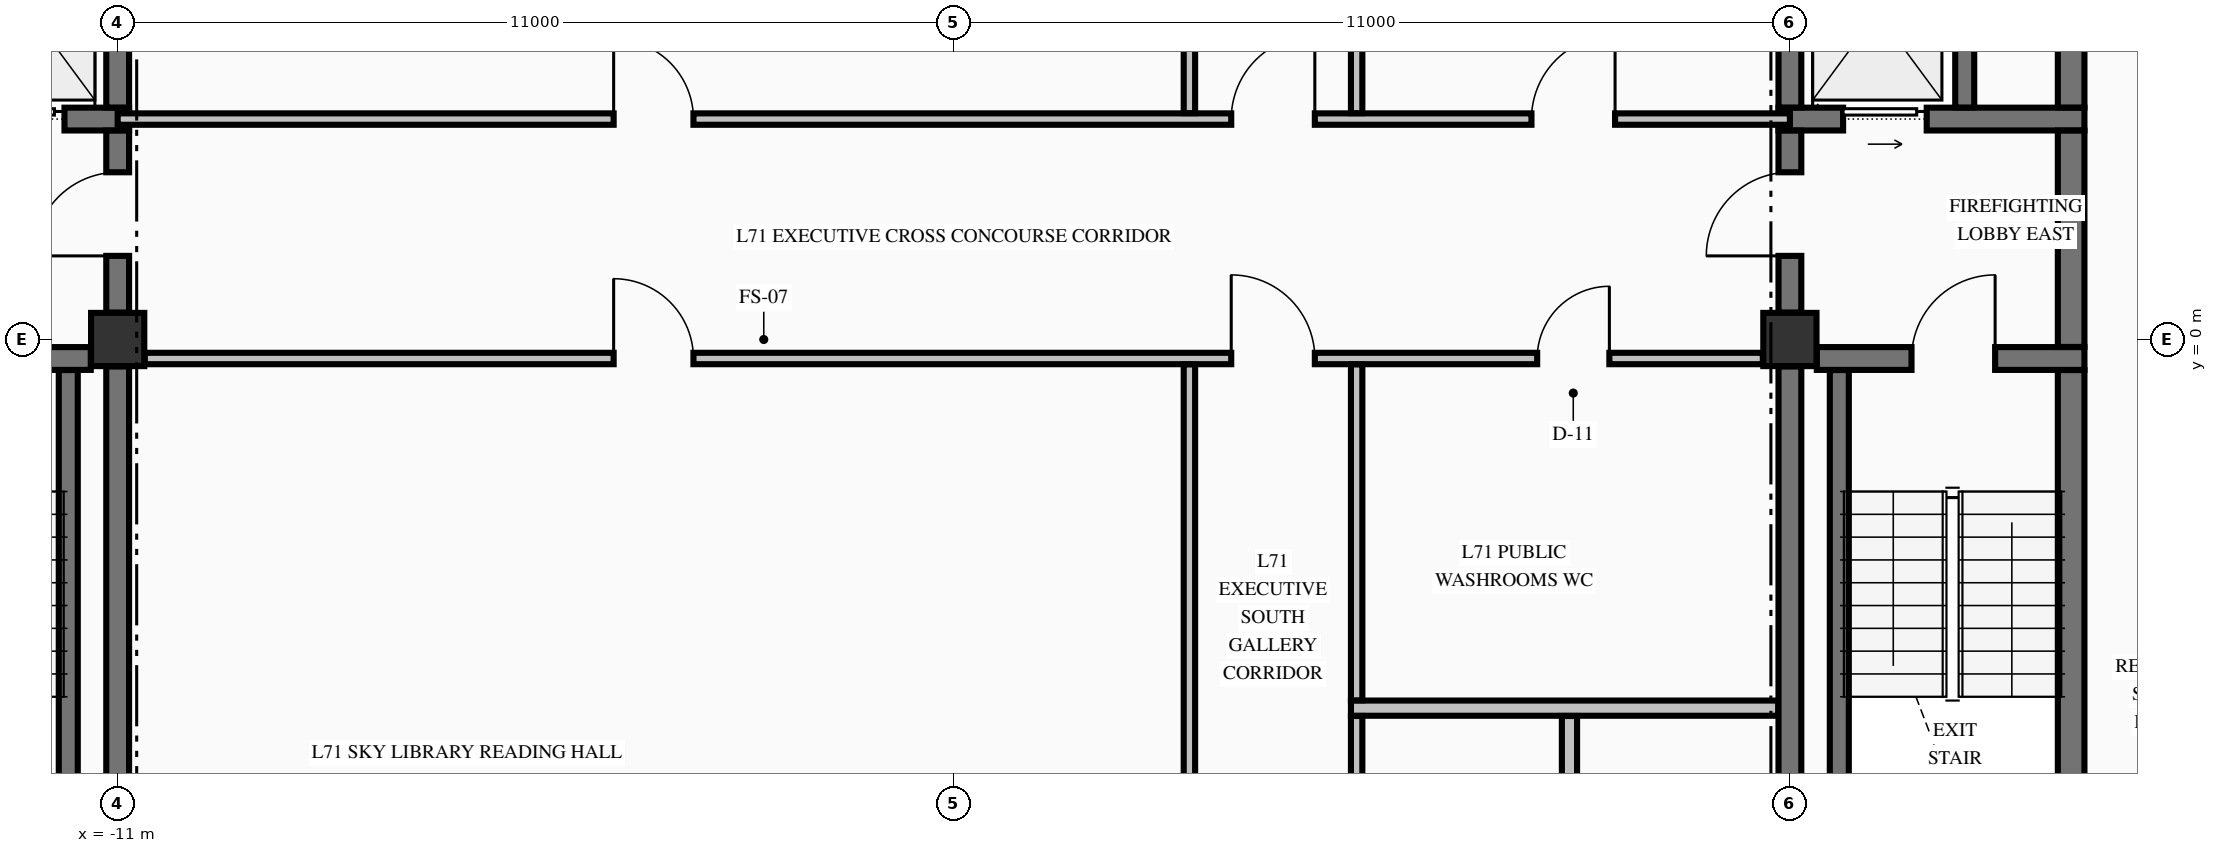
"""IFC4 building model, lengths in metres.
Left out: names, types, materials, properties, quantities, classifications, styles, units other than length and angle.
Written with IfcOpenShell. Run it as: python <this file> out.ifc"""

import sys

from ifc_helpers import new_model, si_unit, direction, frame, frame_2d, origin, origin_2d, place, context, subcontext, project, spatial, rectangle, extrude, element, fill, save


model = new_model("IFC4")
c1 = context("Model", 3, precision=1e-05, world=origin(), true_north=direction((0.0, 1.0)))
c2 = subcontext(c1, "Body", "Model", "MODEL_VIEW")
j1 = project(units=[si_unit("LENGTHUNIT", "METRE"), si_unit("PLANEANGLEUNIT", "RADIAN")], contexts=[c1])
p1 = place(None, origin())
s1 = spatial("IfcSite", under=j1, at=p1, CompositionType="ELEMENT")
p2 = place(p1, origin())
s2 = spatial("IfcBuilding", under=s1, at=p2, CompositionType="ELEMENT")
p3 = place(p2, frame((0.0, 0.0, 267.35)))
s3 = spatial("IfcBuildingStorey", under=s2, at=p3, CompositionType="ELEMENT", Elevation=267.35)
for number, where, z_axis, x_axis in (
    (1, (-11.0, 0.0, -0.25), (0.0, 0.0, 1.0), (1.0, 0.0, 0.0)),
    (2, (11.0, 0.0, -0.25), (0.0, 0.0, 1.0), (1.0, 0.0, 0.0)),
):
    element("IfcColumn", number, at=place(p3, frame(where, z_axis=z_axis, x_axis=x_axis)), inside=s3, PredefinedType="COLUMN", context=c2, shape_type="SweptSolid", body=[
        extrude(rectangle(XDim=0.7, YDim=0.7, at=origin_2d()), origin(), (0.0, 0.0, 1.0), 3.155),
    ])
p4 = place(p3, frame((-19.646, -0.25, 0.0), z_axis=(0.0, 0.0, 1.0), x_axis=(1.0, 0.0, 0.0)))
e3 = element("IfcWall", 3, at=p4, inside=s3, PredefinedType="SHEAR", context=c2, shape_type="SweptSolid", body=[
    extrude(rectangle(XDim=8.292, YDim=0.3, at=frame_2d((4.146, 0.0))), origin(), (0.0, 0.0, 1.0), 2.905),
])
p5 = place(p4, frame((5.946, 0.0, 0.0)))
e4 = element("IfcOpeningElement", 4, at=p5, cuts=e3, PredefinedType="OPENING", context=c2, shape_type="SweptSolid", body=[
    extrude(rectangle(XDim=1.1, YDim=2.15, at=frame_2d((0.55, 1.075))), frame((0.0, 0.16, 0.0), z_axis=(0.0, -1.0, 0.0), x_axis=(1.0, 0.0, 0.0)), (0.0, 0.0, 1.0), 0.32),
])
p6 = place(p3, frame((11.354, -0.25, 0.0), z_axis=(0.0, 0.0, 1.0), x_axis=(1.0, 0.0, 0.0)))
e5 = element("IfcWall", 5, at=p6, inside=s3, PredefinedType="SHEAR", context=c2, shape_type="SweptSolid", body=[
    extrude(rectangle(XDim=3.521, YDim=0.3, at=frame_2d((1.76, 0.0))), origin(), (0.0, 0.0, 1.0), 2.905),
])
p7 = place(p6, frame((1.246, 0.0, 0.0)))
e6 = element("IfcOpeningElement", 6, at=p7, cuts=e5, PredefinedType="OPENING", context=c2, shape_type="SweptSolid", body=[
    extrude(rectangle(XDim=1.1, YDim=2.15, at=frame_2d((0.55, 1.075))), frame((0.0, 0.16, 0.0), z_axis=(0.0, -1.0, 0.0), x_axis=(1.0, 0.0, 0.0)), (0.0, 0.0, 1.0), 0.32),
])
p8 = place(p3, frame((-14.875, 2.9, 0.0), z_axis=(0.0, 0.0, 1.0), x_axis=(1.0, 0.0, 0.0)))
e7 = element("IfcWall", 7, at=p8, inside=s3, PredefinedType="SHEAR", context=c2, shape_type="SweptSolid", body=[
    extrude(rectangle(XDim=4.025, YDim=0.3, at=frame_2d((2.012, 0.0))), origin(), (0.0, 0.0, 1.0), 2.905),
])
p9 = place(p8, frame((2.075, 0.0, 0.0)))
e8 = element("IfcOpeningElement", 8, at=p9, cuts=e7, PredefinedType="OPENING", context=c2, shape_type="SweptSolid", body=[
    extrude(rectangle(XDim=1.1, YDim=2.2, at=frame_2d((0.55, 1.1))), frame((0.0, 0.16, 0.0), z_axis=(0.0, -1.0, 0.0), x_axis=(1.0, 0.0, 0.0)), (0.0, 0.0, 1.0), 0.32),
])
p10 = place(p3, frame((10.85, 2.9, 0.0), z_axis=(0.0, 0.0, 1.0), x_axis=(1.0, 0.0, 0.0)))
e9 = element("IfcWall", 9, at=p10, inside=s3, PredefinedType="SHEAR", context=c2, shape_type="SweptSolid", body=[
    extrude(rectangle(XDim=4.025, YDim=0.3, at=frame_2d((2.012, 0.0))), origin(), (0.0, 0.0, 1.0), 2.905),
])
p11 = place(p10, frame((0.85, 0.0, 0.0)))
e10 = element("IfcOpeningElement", 10, at=p11, cuts=e9, PredefinedType="OPENING", context=c2, shape_type="SweptSolid", body=[
    extrude(rectangle(XDim=1.1, YDim=2.2, at=frame_2d((0.55, 1.1))), frame((0.0, 0.16, 0.0), z_axis=(0.0, -1.0, 0.0), x_axis=(1.0, 0.0, 0.0)), (0.0, 0.0, 1.0), 0.32),
])
p12 = place(p3, frame((5.225, -4.85, 0.0), z_axis=(0.0, 0.0, 1.0), x_axis=(1.0, 0.0, 0.0)))
e11 = element("IfcWall", 11, at=p12, inside=s3, PredefinedType="PARTITIONING", context=c2, shape_type="SweptSolid", body=[
    extrude(rectangle(XDim=5.622, YDim=0.2, at=frame_2d((2.811, 0.0))), origin(), (0.0, 0.0, 1.0), 2.905),
])
p13 = place(p3, frame((-10.644, -0.25, 0.0), z_axis=(0.0, 0.0, 1.0), x_axis=(1.0, 0.0, 0.0)))
e12 = element("IfcWall", 12, at=p13, inside=s3, PredefinedType="PARTITIONING", context=c2, shape_type="SweptSolid", body=[
    extrude(rectangle(XDim=21.288, YDim=0.15, at=frame_2d((10.644, 0.0))), origin(), (0.0, 0.0, 1.0), 2.905),
])
p14 = place(p13, frame((14.294, 0.0, 0.0)))
e13 = element("IfcOpeningElement", 13, at=p14, cuts=e12, PredefinedType="OPENING", context=c2, shape_type="SweptSolid", body=[
    extrude(rectangle(XDim=1.1, YDim=2.15, at=frame_2d((0.55, 1.075))), frame((0.0, 0.085, 0.0), z_axis=(0.0, -1.0, 0.0), x_axis=(1.0, 0.0, 0.0)), (0.0, 0.0, 1.0), 0.17),
])
p15 = place(p13, frame((6.169, 0.0, 0.0)))
e14 = element("IfcOpeningElement", 14, at=p15, cuts=e12, PredefinedType="OPENING", context=c2, shape_type="SweptSolid", body=[
    extrude(rectangle(XDim=1.05, YDim=2.15, at=frame_2d((0.525, 1.075))), frame((0.0, 0.085, 0.0), z_axis=(0.0, -1.0, 0.0), x_axis=(1.0, 0.0, 0.0)), (0.0, 0.0, 1.0), 0.17),
])
p16 = place(p13, frame((18.319, 0.0, 0.0)))
e15 = element("IfcOpeningElement", 15, at=p16, cuts=e12, PredefinedType="OPENING", context=c2, shape_type="SweptSolid", body=[
    extrude(rectangle(XDim=0.95, YDim=2.15, at=frame_2d((0.475, 1.075))), frame((0.0, 0.085, 0.0), z_axis=(0.0, -1.0, 0.0), x_axis=(1.0, 0.0, 0.0)), (0.0, 0.0, 1.0), 0.17),
])
p17 = place(p3, frame((-11.0, 2.9, 0.0), z_axis=(0.0, 0.0, 1.0), x_axis=(1.0, 0.0, 0.0)))
e16 = element("IfcWall", 16, at=p17, inside=s3, PredefinedType="PARTITIONING", context=c2, shape_type="SweptSolid", body=[
    extrude(rectangle(XDim=22.0, YDim=0.15, at=frame_2d((11.0, 0.0))), origin(), (0.0, 0.0, 1.0), 2.905),
])
p18 = place(p17, frame((14.65, 0.0, 0.0)))
e17 = element("IfcOpeningElement", 17, at=p18, cuts=e16, PredefinedType="OPENING", context=c2, shape_type="SweptSolid", body=[
    extrude(rectangle(XDim=1.1, YDim=2.15, at=frame_2d((0.55, 1.075))), frame((0.0, 0.085, 0.0), z_axis=(0.0, -1.0, 0.0), x_axis=(1.0, 0.0, 0.0)), (0.0, 0.0, 1.0), 0.17),
])
p19 = place(p17, frame((6.525, 0.0, 0.0)))
e18 = element("IfcOpeningElement", 18, at=p19, cuts=e16, PredefinedType="OPENING", context=c2, shape_type="SweptSolid", body=[
    extrude(rectangle(XDim=1.05, YDim=2.15, at=frame_2d((0.525, 1.075))), frame((0.0, 0.085, 0.0), z_axis=(0.0, -1.0, 0.0), x_axis=(1.0, 0.0, 0.0)), (0.0, 0.0, 1.0), 0.17),
])
p20 = place(p17, frame((18.6, 0.0, 0.0)))
e19 = element("IfcOpeningElement", 19, at=p20, cuts=e16, PredefinedType="OPENING", context=c2, shape_type="SweptSolid", body=[
    extrude(rectangle(XDim=1.1, YDim=2.15, at=frame_2d((0.55, 1.075))), frame((0.0, 0.085, 0.0), z_axis=(0.0, -1.0, 0.0), x_axis=(1.0, 0.0, 0.0)), (0.0, 0.0, 1.0), 0.17),
])
p21 = place(p3, frame((-11.65, -9.798, 0.0), z_axis=(0.0, 0.0, 1.0), x_axis=(0.0, 1.0, 0.0)))
e20 = element("IfcWall", 20, at=p21, inside=s3, PredefinedType="SOLIDWALL", context=c2, shape_type="SweptSolid", body=[
    extrude(rectangle(XDim=9.396, YDim=0.25, at=frame_2d((4.698, 0.0))), origin(), (0.0, 0.0, 1.0), 2.905),
])
p22 = place(p3, frame((-11.0, -9.596, 0.0), z_axis=(0.0, 0.0, 1.0), x_axis=(0.0, 1.0, 0.0)))
e21 = element("IfcWall", 21, at=p22, inside=s3, PredefinedType="SHEAR", context=c2, shape_type="SweptSolid", body=[
    extrude(rectangle(XDim=9.242, YDim=0.3, at=frame_2d((4.621, 0.0))), origin(), (0.0, 0.0, 1.0), 2.905),
])
p23 = place(p3, frame((-11.0, 0.354, 0.0), z_axis=(0.0, 0.0, 1.0), x_axis=(0.0, 1.0, 0.0)))
e22 = element("IfcWall", 22, at=p23, inside=s3, PredefinedType="SHEAR", context=c2, shape_type="SweptSolid", body=[
    extrude(rectangle(XDim=2.394, YDim=0.3, at=frame_2d((1.197, 0.0))), origin(), (0.0, 0.0, 1.0), 2.905),
])
p24 = place(p23, frame((0.746, 0.0, 0.0)))
e23 = element("IfcOpeningElement", 23, at=p24, cuts=e22, PredefinedType="OPENING", context=c2, shape_type="SweptSolid", body=[
    extrude(rectangle(XDim=1.1, YDim=2.15, at=frame_2d((0.55, 1.075))), frame((0.0, 0.16, 0.0), z_axis=(0.0, -1.0, 0.0), x_axis=(1.0, 0.0, 0.0)), (0.0, 0.0, 1.0), 0.32),
])
p25 = place(p3, frame((-11.0, 3.052, 0.0), z_axis=(0.0, 0.0, 1.0), x_axis=(0.0, 1.0, 0.0)))
e24 = element("IfcWall", 24, at=p25, inside=s3, PredefinedType="SHEAR", context=c2, shape_type="SweptSolid", body=[
    extrude(rectangle(XDim=2.496, YDim=0.3, at=frame_2d((1.248, 0.0))), origin(), (0.0, 0.0, 1.0), 2.905),
])
p26 = place(p3, frame((11.0, -9.596, 0.0), z_axis=(0.0, 0.0, 1.0), x_axis=(0.0, 1.0, 0.0)))
e25 = element("IfcWall", 25, at=p26, inside=s3, PredefinedType="SHEAR", context=c2, shape_type="SweptSolid", body=[
    extrude(rectangle(XDim=9.242, YDim=0.3, at=frame_2d((4.621, 0.0))), origin(), (0.0, 0.0, 1.0), 2.905),
])
p27 = place(p3, frame((11.0, 0.354, 0.0), z_axis=(0.0, 0.0, 1.0), x_axis=(0.0, 1.0, 0.0)))
e26 = element("IfcWall", 26, at=p27, inside=s3, PredefinedType="SHEAR", context=c2, shape_type="SweptSolid", body=[
    extrude(rectangle(XDim=2.394, YDim=0.3, at=frame_2d((1.197, 0.0))), origin(), (0.0, 0.0, 1.0), 2.905),
])
p28 = place(p27, frame((0.746, 0.0, 0.0)))
e27 = element("IfcOpeningElement", 27, at=p28, cuts=e26, PredefinedType="OPENING", context=c2, shape_type="SweptSolid", body=[
    extrude(rectangle(XDim=1.1, YDim=2.15, at=frame_2d((0.55, 1.075))), frame((0.0, 0.16, 0.0), z_axis=(0.0, -1.0, 0.0), x_axis=(1.0, 0.0, 0.0)), (0.0, 0.0, 1.0), 0.32),
])
p29 = place(p3, frame((11.0, 3.052, 0.0), z_axis=(0.0, 0.0, 1.0), x_axis=(0.0, 1.0, 0.0)))
e28 = element("IfcWall", 28, at=p29, inside=s3, PredefinedType="SHEAR", context=c2, shape_type="SweptSolid", body=[
    extrude(rectangle(XDim=2.496, YDim=0.3, at=frame_2d((1.248, 0.0))), origin(), (0.0, 0.0, 1.0), 2.905),
])
p30 = place(p3, frame((11.65, -9.798, 0.0), z_axis=(0.0, 0.0, 1.0), x_axis=(0.0, 1.0, 0.0)))
e29 = element("IfcWall", 29, at=p30, inside=s3, PredefinedType="SOLIDWALL", context=c2, shape_type="SweptSolid", body=[
    extrude(rectangle(XDim=9.396, YDim=0.25, at=frame_2d((4.698, 0.0))), origin(), (0.0, 0.0, 1.0), 2.905),
])
p31 = place(p3, frame((13.3, 3.052, 0.0), z_axis=(0.0, 0.0, 1.0), x_axis=(0.0, 1.0, 0.0)))
e30 = element("IfcWall", 30, at=p31, inside=s3, PredefinedType="SOLIDWALL", context=c2, shape_type="SweptSolid", body=[
    extrude(rectangle(XDim=2.496, YDim=0.25, at=frame_2d((1.248, 0.0))), origin(), (0.0, 0.0, 1.0), 2.905),
])
p32 = place(p3, frame((14.7, -9.773, 0.0), z_axis=(0.0, 0.0, 1.0), x_axis=(0.0, 1.0, 0.0)))
e31 = element("IfcWall", 31, at=p32, inside=s3, PredefinedType="SHEAR", context=c2, shape_type="SweptSolid", body=[
    extrude(rectangle(XDim=9.371, YDim=0.35, at=frame_2d((4.686, 0.0))), origin(), (0.0, 0.0, 1.0), 2.905),
])
p33 = place(p3, frame((14.7, -0.098, 0.0), z_axis=(0.0, 0.0, 1.0), x_axis=(0.0, 1.0, 0.0)))
e32 = element("IfcWall", 32, at=p33, inside=s3, PredefinedType="SHEAR", context=c2, shape_type="SweptSolid", body=[
    extrude(rectangle(XDim=2.846, YDim=0.35, at=frame_2d((1.423, 0.0))), origin(), (0.0, 0.0, 1.0), 2.905),
])
p34 = place(p3, frame((14.7, 3.052, 0.0), z_axis=(0.0, 0.0, 1.0), x_axis=(0.0, 1.0, 0.0)))
e33 = element("IfcWall", 33, at=p34, inside=s3, PredefinedType="SHEAR", context=c2, shape_type="SweptSolid", body=[
    extrude(rectangle(XDim=2.496, YDim=0.35, at=frame_2d((1.248, 0.0))), origin(), (0.0, 0.0, 1.0), 2.905),
])
p35 = place(p3, frame((3.1, -9.872, 0.0), z_axis=(0.0, 0.0, 1.0), x_axis=(0.0, 1.0, 0.0)))
e34 = element("IfcWall", 34, at=p35, inside=s3, PredefinedType="PARTITIONING", context=c2, shape_type="SweptSolid", body=[
    extrude(rectangle(XDim=9.544, YDim=0.15, at=frame_2d((4.772, 0.0))), origin(), (0.0, 0.0, 1.0), 2.905),
])
p36 = place(p3, frame((3.1, 2.978, 0.0), z_axis=(0.0, 0.0, 1.0), x_axis=(0.0, 1.0, 0.0)))
e35 = element("IfcWall", 35, at=p36, inside=s3, PredefinedType="PARTITIONING", context=c2, shape_type="SweptSolid", body=[
    extrude(rectangle(XDim=7.444, YDim=0.15, at=frame_2d((3.722, 0.0))), origin(), (0.0, 0.0, 1.0), 2.905),
])
p37 = place(p3, frame((5.3, -9.872, 0.0), z_axis=(0.0, 0.0, 1.0), x_axis=(0.0, 1.0, 0.0)))
e36 = element("IfcWall", 36, at=p37, inside=s3, PredefinedType="PARTITIONING", context=c2, shape_type="SweptSolid", body=[
    extrude(rectangle(XDim=4.919, YDim=0.15, at=frame_2d((2.459, 0.0))), origin(), (0.0, 0.0, 1.0), 2.905),
])
p38 = place(p37, frame((1.997, 0.0, 0.0)))
e37 = element("IfcOpeningElement", 37, at=p38, cuts=e36, PredefinedType="OPENING", context=c2, shape_type="SweptSolid", body=[
    extrude(rectangle(XDim=0.95, YDim=2.15, at=frame_2d((0.475, 1.075))), frame((0.0, 0.085, 0.0), z_axis=(0.0, -1.0, 0.0), x_axis=(1.0, 0.0, 0.0)), (0.0, 0.0, 1.0), 0.17),
])
p39 = place(p3, frame((5.3, -4.747, 0.0), z_axis=(0.0, 0.0, 1.0), x_axis=(0.0, 1.0, 0.0)))
e38 = element("IfcWall", 38, at=p39, inside=s3, PredefinedType="PARTITIONING", context=c2, shape_type="SweptSolid", body=[
    extrude(rectangle(XDim=4.419, YDim=0.15, at=frame_2d((2.209, 0.0))), origin(), (0.0, 0.0, 1.0), 2.905),
])
p40 = place(p3, frame((5.3, 2.978, 0.0), z_axis=(0.0, 0.0, 1.0), x_axis=(0.0, 1.0, 0.0)))
e39 = element("IfcWall", 39, at=p40, inside=s3, PredefinedType="PARTITIONING", context=c2, shape_type="SweptSolid", body=[
    extrude(rectangle(XDim=7.444, YDim=0.15, at=frame_2d((3.722, 0.0))), origin(), (0.0, 0.0, 1.0), 2.905),
])
p41 = place(p3, frame((8.1, -9.872, 0.0), z_axis=(0.0, 0.0, 1.0), x_axis=(0.0, 1.0, 0.0)))
e40 = element("IfcWall", 40, at=p41, inside=s3, PredefinedType="PARTITIONING", context=c2, shape_type="SweptSolid", body=[
    extrude(rectangle(XDim=4.919, YDim=0.2, at=frame_2d((2.459, 0.0))), origin(), (0.0, 0.0, 1.0), 2.905),
])
p42 = place(p24, origin())
e41 = element("IfcDoor", 41, at=p42, inside=s3, OperationType="SINGLE_SWING_LEFT", PredefinedType="DOOR", context=c2, shape_type="SweptSolid", body=[
    extrude(rectangle(XDim=1.1, YDim=2.15, at=frame_2d((0.55, 1.075))), frame((0.0, 0.025, 0.0), z_axis=(0.0, -1.0, 0.0), x_axis=(1.0, 0.0, 0.0)), (0.0, 0.0, 1.0), 0.05),
])
fill(e23, e41)
p43 = place(p9, origin())
e42 = element("IfcDoor", 42, at=p43, inside=s3, OperationType="SLIDING_TO_LEFT", PredefinedType="DOOR", context=c2, shape_type="SweptSolid", body=[
    extrude(rectangle(XDim=1.1, YDim=2.2, at=frame_2d((0.55, 1.1))), frame((0.0, 0.025, 0.0), z_axis=(0.0, -1.0, 0.0), x_axis=(1.0, 0.0, 0.0)), (0.0, 0.0, 1.0), 0.05),
])
fill(e8, e42)
p44 = place(p7, origin())
e43 = element("IfcDoor", 43, at=p44, inside=s3, OperationType="SINGLE_SWING_RIGHT", PredefinedType="DOOR", context=c2, shape_type="SweptSolid", body=[
    extrude(rectangle(XDim=1.1, YDim=2.15, at=frame_2d((0.55, 1.075))), frame((0.0, 0.025, 0.0), z_axis=(0.0, -1.0, 0.0), x_axis=(1.0, 0.0, 0.0)), (0.0, 0.0, 1.0), 0.05),
])
fill(e6, e43)
p45 = place(p28, origin())
e44 = element("IfcDoor", 44, at=p45, inside=s3, OperationType="SINGLE_SWING_LEFT", PredefinedType="DOOR", context=c2, shape_type="SweptSolid", body=[
    extrude(rectangle(XDim=1.1, YDim=2.15, at=frame_2d((0.55, 1.075))), frame((0.0, 0.025, 0.0), z_axis=(0.0, -1.0, 0.0), x_axis=(1.0, 0.0, 0.0)), (0.0, 0.0, 1.0), 0.05),
])
fill(e27, e44)
p46 = place(p11, origin())
e45 = element("IfcDoor", 45, at=p46, inside=s3, OperationType="SLIDING_TO_RIGHT", PredefinedType="DOOR", context=c2, shape_type="SweptSolid", body=[
    extrude(rectangle(XDim=1.1, YDim=2.2, at=frame_2d((0.55, 1.1))), frame((0.0, 0.025, 0.0), z_axis=(0.0, -1.0, 0.0), x_axis=(1.0, 0.0, 0.0)), (0.0, 0.0, 1.0), 0.05),
])
fill(e10, e45)
p47 = place(p18, origin())
e46 = element("IfcDoor", 46, at=p47, inside=s3, OperationType="SINGLE_SWING_RIGHT", PredefinedType="DOOR", context=c2, shape_type="SweptSolid", body=[
    extrude(rectangle(XDim=1.1, YDim=2.15, at=frame_2d((0.55, 1.075))), frame((0.0, 0.025, 0.0), z_axis=(0.0, -1.0, 0.0), x_axis=(1.0, 0.0, 0.0)), (0.0, 0.0, 1.0), 0.05),
])
fill(e17, e46)
p48 = place(p14, origin())
e47 = element("IfcDoor", 47, at=p48, inside=s3, OperationType="SINGLE_SWING_LEFT", PredefinedType="DOOR", context=c2, shape_type="SweptSolid", body=[
    extrude(rectangle(XDim=1.1, YDim=2.15, at=frame_2d((0.55, 1.075))), frame((0.0, 0.025, 0.0), z_axis=(0.0, -1.0, 0.0), x_axis=(1.0, 0.0, 0.0)), (0.0, 0.0, 1.0), 0.05),
])
fill(e13, e47)
p49 = place(p19, origin())
e48 = element("IfcDoor", 48, at=p49, inside=s3, OperationType="SINGLE_SWING_LEFT", PredefinedType="DOOR", context=c2, shape_type="SweptSolid", body=[
    extrude(rectangle(XDim=1.05, YDim=2.15, at=frame_2d((0.525, 1.075))), frame((0.0, 0.025, 0.0), z_axis=(0.0, -1.0, 0.0), x_axis=(1.0, 0.0, 0.0)), (0.0, 0.0, 1.0), 0.05),
])
fill(e18, e48)
p50 = place(p20, origin())
e49 = element("IfcDoor", 49, at=p50, inside=s3, OperationType="SINGLE_SWING_RIGHT", PredefinedType="DOOR", context=c2, shape_type="SweptSolid", body=[
    extrude(rectangle(XDim=1.1, YDim=2.15, at=frame_2d((0.55, 1.075))), frame((0.0, 0.025, 0.0), z_axis=(0.0, -1.0, 0.0), x_axis=(1.0, 0.0, 0.0)), (0.0, 0.0, 1.0), 0.05),
])
fill(e19, e49)
p51 = place(p15, origin())
e50 = element("IfcDoor", 50, at=p51, inside=s3, OperationType="SINGLE_SWING_LEFT", PredefinedType="DOOR", context=c2, shape_type="SweptSolid", body=[
    extrude(rectangle(XDim=1.05, YDim=2.15, at=frame_2d((0.525, 1.075))), frame((0.0, 0.025, 0.0), z_axis=(0.0, -1.0, 0.0), x_axis=(1.0, 0.0, 0.0)), (0.0, 0.0, 1.0), 0.05),
])
fill(e14, e50)
p52 = place(p16, origin())
e51 = element("IfcDoor", 51, at=p52, inside=s3, OperationType="SINGLE_SWING_RIGHT", PredefinedType="DOOR", context=c2, shape_type="SweptSolid", body=[
    extrude(rectangle(XDim=0.95, YDim=2.15, at=frame_2d((0.475, 1.075))), frame((0.0, 0.025, 0.0), z_axis=(0.0, -1.0, 0.0), x_axis=(1.0, 0.0, 0.0)), (0.0, 0.0, 1.0), 0.05),
])
fill(e15, e51)
save(model, sys.argv[1])
